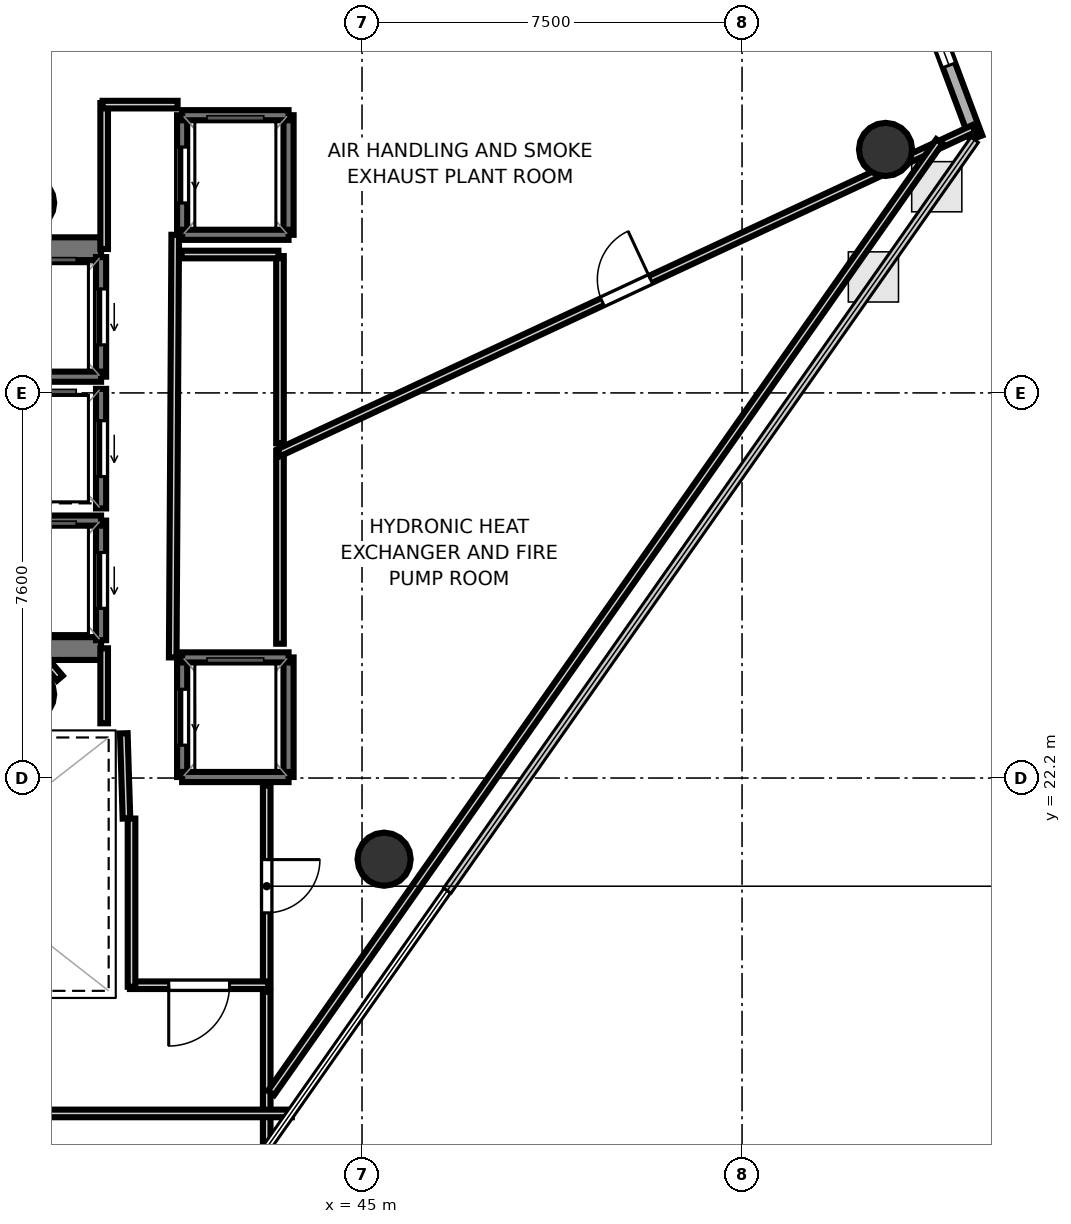
"""IFC4 building model, lengths in metres.
Left out: names, types, materials, properties, quantities, classifications, styles, units other than length and angle.
Written with IfcOpenShell. Run it as: python <this file> out.ifc"""

import sys

from ifc_helpers import new_model, si_unit, direction, frame, frame_2d, origin, origin_2d, place, context, subcontext, project, spatial, rectangle, hollow_circle, extrude, element, fill, save


model = new_model("IFC4")
c1 = context("Model", 3, precision=1e-05, world=origin(), true_north=direction((0.0, 1.0)))
c2 = subcontext(c1, "Body", "Model", "MODEL_VIEW")
j1 = project(units=[si_unit("LENGTHUNIT", "METRE"), si_unit("PLANEANGLEUNIT", "RADIAN")], contexts=[c1])
p1 = place(None, origin())
s1 = spatial("IfcSite", under=j1, at=p1, CompositionType="ELEMENT")
p2 = place(p1, origin())
s2 = spatial("IfcBuilding", under=s1, at=p2, CompositionType="ELEMENT")
p3 = place(p2, frame((0.0, 0.0, 276.0)))
s3 = spatial("IfcBuildingStorey", under=s2, at=p3, CompositionType="ELEMENT", Elevation=276.0)
p4 = place(p3, frame((29.33, 32.645, 0.0), z_axis=(0.0, 0.0, 1.0), x_axis=(1.0, 0.0, 0.0)))
e1 = element("IfcWall", 1, at=p4, inside=s3, PredefinedType="SHEAR", context=c2, shape_type="SweptSolid", body=[
    extrude(rectangle(XDim=10.52, YDim=0.45, at=frame_2d((5.26, 0.0))), origin(), (0.0, 0.0, 1.0), 4.42),
])
p5 = place(p4, frame((0.895, 0.0, 0.0)))
e2 = element("IfcOpeningElement", 2, at=p5, cuts=e1, PredefinedType="OPENING", context=c2, shape_type="SweptSolid", body=[
    extrude(rectangle(XDim=1.25, YDim=2.15, at=frame_2d((0.625, 1.075))), frame((0.0, 0.235, 0.0), z_axis=(0.0, -1.0, 0.0), x_axis=(1.0, 0.0, 0.0)), (0.0, 0.0, 1.0), 0.47),
])
p6 = place(p3, frame((29.33, 24.755, 0.0), z_axis=(0.0, 0.0, 1.0), x_axis=(1.0, 0.0, 0.0)))
e3 = element("IfcWall", 3, at=p6, inside=s3, PredefinedType="SHEAR", context=c2, shape_type="SweptSolid", body=[
    extrude(rectangle(XDim=10.52, YDim=0.45, at=frame_2d((5.26, 0.0))), origin(), (0.0, 0.0, 1.0), 4.42),
])
p7 = place(p6, frame((0.695, 0.0, 0.0)))
e4 = element("IfcOpeningElement", 4, at=p7, cuts=e3, PredefinedType="OPENING", context=c2, shape_type="SweptSolid", body=[
    extrude(rectangle(XDim=1.25, YDim=2.15, at=frame_2d((0.625, 1.075))), frame((0.0, 0.235, 0.0), z_axis=(0.0, -1.0, 0.0), x_axis=(1.0, 0.0, 0.0)), (0.0, 0.0, 1.0), 0.47),
])
for number, where, z_axis, x_axis in (
    (5, (38.4, 33.55, 0.0), (0.0, 0.0, 1.0), (1.0, 0.0, 0.0)),
    (6, (38.4, 23.85, 0.0), (0.0, 0.0, 1.0), (1.0, 0.0, 0.0)),
    (7, (55.332, 34.605, 0.0), (0.0, 0.0, 1.0), (1.0, 0.0, 0.0)),
    (8, (45.436, 20.598, 0.0), (0.0, 0.0, 1.0), (1.0, 0.0, 0.0)),
):
    element("IfcColumn", number, at=place(p3, frame(where, z_axis=z_axis, x_axis=x_axis)), inside=s3, PredefinedType="COLUMN", context=c2, shape_type="SweptSolid", body=[
        extrude(hollow_circle(Radius=0.525, WallThickness=0.028, at=origin_2d()), origin(), (0.0, 0.0, 1.0), 4.6),
    ])
p8 = place(p3, frame((57.12, 34.836, 0.0), z_axis=(0.0, 0.0, 1.0), x_axis=(-0.350828926288, 0.93643956798, 0.0)))
e9 = element("IfcWall", 9, at=p8, inside=s3, PredefinedType="SOLIDWALL", context=c2, shape_type="SweptSolid", body=[
    extrude(rectangle(XDim=4.452, YDim=0.26, at=frame_2d((2.226, 0.0))), origin(), (0.0, 0.0, 1.0), 4.42),
])
p9 = place(p8, frame((1.526, 0.0, 1.0)))
e10 = element("IfcOpeningElement", 10, at=p9, cuts=e9, PredefinedType="OPENING", context=c2, shape_type="SweptSolid", body=[
    extrude(rectangle(XDim=1.4, YDim=1.5, at=frame_2d((0.7, 0.75))), frame((0.0, 0.14, 0.0), z_axis=(0.0, -1.0, 0.0), x_axis=(1.0, 0.0, 0.0)), (0.0, 0.0, 1.0), 0.28),
])
p10 = place(p3, frame((39.85, 30.12, 0.0), z_axis=(0.0, 0.0, 1.0), x_axis=(0.0, 1.0, 0.0)))
e11 = element("IfcWall", 11, at=p10, inside=s3, PredefinedType="SOLIDWALL", context=c2, shape_type="SweptSolid", body=[
    extrude(rectangle(XDim=2.36, YDim=0.2, at=frame_2d((1.18, 0.0))), origin(), (0.0, 0.0, 1.0), 4.42),
])
p11 = place(p10, frame((0.63, 0.0, 0.0)))
e12 = element("IfcOpeningElement", 12, at=p11, cuts=e11, PredefinedType="OPENING", context=c2, shape_type="SweptSolid", body=[
    extrude(rectangle(XDim=1.1, YDim=2.15, at=frame_2d((0.55, 1.075))), frame((0.0, 0.11, 0.0), z_axis=(0.0, -1.0, 0.0), x_axis=(1.0, 0.0, 0.0)), (0.0, 0.0, 1.0), 0.22),
])
p12 = place(p3, frame((37.75, 30.12, 0.0), z_axis=(0.0, 0.0, 1.0), x_axis=(1.0, 0.0, 0.0)))
e13 = element("IfcWall", 13, at=p12, inside=s3, PredefinedType="SOLIDWALL", context=c2, shape_type="SweptSolid", body=[
    extrude(rectangle(XDim=2.1, YDim=0.2, at=frame_2d((1.05, 0.0))), origin(), (0.0, 0.0, 1.0), 4.42),
])
p13 = place(p3, frame((39.85, 24.92, 0.0), z_axis=(0.0, 0.0, 1.0), x_axis=(0.0, 1.0, 0.0)))
e14 = element("IfcWall", 14, at=p13, inside=s3, PredefinedType="SOLIDWALL", context=c2, shape_type="SweptSolid", body=[
    extrude(rectangle(XDim=2.36, YDim=0.2, at=frame_2d((1.18, 0.0))), origin(), (0.0, 0.0, 1.0), 4.42),
])
p14 = place(p13, frame((0.63, 0.0, 0.0)))
e15 = element("IfcOpeningElement", 15, at=p14, cuts=e14, PredefinedType="OPENING", context=c2, shape_type="SweptSolid", body=[
    extrude(rectangle(XDim=1.1, YDim=2.15, at=frame_2d((0.55, 1.075))), frame((0.0, 0.11, 0.0), z_axis=(0.0, -1.0, 0.0), x_axis=(1.0, 0.0, 0.0)), (0.0, 0.0, 1.0), 0.22),
])
p15 = place(p3, frame((37.75, 27.28, 0.0), z_axis=(0.0, 0.0, 1.0), x_axis=(1.0, 0.0, 0.0)))
e16 = element("IfcWall", 16, at=p15, inside=s3, PredefinedType="SOLIDWALL", context=c2, shape_type="SweptSolid", body=[
    extrude(rectangle(XDim=2.1, YDim=0.2, at=frame_2d((1.05, 0.0))), origin(), (0.0, 0.0, 1.0), 4.42),
])
p16 = place(p3, frame((39.85, 27.52, 0.0), z_axis=(0.0, 0.0, 1.0), x_axis=(0.0, 1.0, 0.0)))
e17 = element("IfcWall", 17, at=p16, inside=s3, PredefinedType="SOLIDWALL", context=c2, shape_type="SweptSolid", body=[
    extrude(rectangle(XDim=2.36, YDim=0.2, at=frame_2d((1.18, 0.0))), origin(), (0.0, 0.0, 1.0), 4.42),
])
p17 = place(p16, frame((0.63, 0.0, 0.0)))
e18 = element("IfcOpeningElement", 18, at=p17, cuts=e17, PredefinedType="OPENING", context=c2, shape_type="SweptSolid", body=[
    extrude(rectangle(XDim=1.1, YDim=2.15, at=frame_2d((0.55, 1.075))), frame((0.0, 0.11, 0.0), z_axis=(0.0, -1.0, 0.0), x_axis=(1.0, 0.0, 0.0)), (0.0, 0.0, 1.0), 0.22),
])
p18 = place(p3, frame((43.55, 22.22, 0.0), z_axis=(0.0, 0.0, 1.0), x_axis=(0.0, 1.0, 0.0)))
e19 = element("IfcWall", 19, at=p18, inside=s3, PredefinedType="SOLIDWALL", context=c2, shape_type="SweptSolid", body=[
    extrude(rectangle(XDim=2.36, YDim=0.2, at=frame_2d((1.18, 0.0))), origin(), (0.0, 0.0, 1.0), 4.42),
])
p19 = place(p3, frame((41.45, 22.22, 0.0), z_axis=(0.0, 0.0, 1.0), x_axis=(0.0, 1.0, 0.0)))
e20 = element("IfcWall", 20, at=p19, inside=s3, PredefinedType="SOLIDWALL", context=c2, shape_type="SweptSolid", body=[
    extrude(rectangle(XDim=2.36, YDim=0.2, at=frame_2d((1.18, 0.0))), origin(), (0.0, 0.0, 1.0), 4.42),
])
p20 = place(p19, frame((0.63, 0.0, 0.0)))
e21 = element("IfcOpeningElement", 21, at=p20, cuts=e20, PredefinedType="OPENING", context=c2, shape_type="SweptSolid", body=[
    extrude(rectangle(XDim=1.1, YDim=2.15, at=frame_2d((0.55, 1.075))), frame((0.0, 0.11, 0.0), z_axis=(0.0, -1.0, 0.0), x_axis=(1.0, 0.0, 0.0)), (0.0, 0.0, 1.0), 0.22),
])
for number, where, z_axis, x_axis in (
    (22, (41.45, 24.58, 0.0), (0.0, 0.0, 1.0), (1.0, 0.0, 0.0)),
    (23, (41.45, 22.22, 0.0), (0.0, 0.0, 1.0), (1.0, 0.0, 0.0)),
):
    element("IfcWall", number, at=place(p3, frame(where, z_axis=z_axis, x_axis=x_axis)), inside=s3, PredefinedType="SOLIDWALL", context=c2, shape_type="SweptSolid", body=[
        extrude(rectangle(XDim=2.1, YDim=0.2, at=frame_2d((1.05, 0.0))), origin(), (0.0, 0.0, 1.0), 4.42),
    ])
p21 = place(p3, frame((43.55, 32.92, 0.0), z_axis=(0.0, 0.0, 1.0), x_axis=(0.0, 1.0, 0.0)))
e24 = element("IfcWall", 24, at=p21, inside=s3, PredefinedType="SOLIDWALL", context=c2, shape_type="SweptSolid", body=[
    extrude(rectangle(XDim=2.36, YDim=0.2, at=frame_2d((1.18, 0.0))), origin(), (0.0, 0.0, 1.0), 4.42),
])
p22 = place(p3, frame((41.45, 32.92, 0.0), z_axis=(0.0, 0.0, 1.0), x_axis=(0.0, 1.0, 0.0)))
e25 = element("IfcWall", 25, at=p22, inside=s3, PredefinedType="SOLIDWALL", context=c2, shape_type="SweptSolid", body=[
    extrude(rectangle(XDim=2.36, YDim=0.2, at=frame_2d((1.18, 0.0))), origin(), (0.0, 0.0, 1.0), 4.42),
])
p23 = place(p22, frame((0.63, 0.0, 0.0)))
e26 = element("IfcOpeningElement", 26, at=p23, cuts=e25, PredefinedType="OPENING", context=c2, shape_type="SweptSolid", body=[
    extrude(rectangle(XDim=1.1, YDim=2.15, at=frame_2d((0.55, 1.075))), frame((0.0, 0.11, 0.0), z_axis=(0.0, -1.0, 0.0), x_axis=(1.0, 0.0, 0.0)), (0.0, 0.0, 1.0), 0.22),
])
for number, where, z_axis, x_axis in (
    (27, (41.45, 35.28, 0.0), (0.0, 0.0, 1.0), (1.0, 0.0, 0.0)),
    (28, (41.45, 32.92, 0.0), (0.0, 0.0, 1.0), (1.0, 0.0, 0.0)),
):
    element("IfcWall", number, at=place(p3, frame(where, z_axis=z_axis, x_axis=x_axis)), inside=s3, PredefinedType="SOLIDWALL", context=c2, shape_type="SweptSolid", body=[
        extrude(rectangle(XDim=2.1, YDim=0.2, at=frame_2d((1.05, 0.0))), origin(), (0.0, 0.0, 1.0), 4.42),
    ])
p24 = place(p3, frame((40.351, 21.401, 0.0), z_axis=(0.0, 0.0, 1.0), x_axis=(-0.031058045979, 0.999517582527, 0.0)))
e29 = element("IfcWall", 29, at=p24, inside=s3, PredefinedType="PARTITIONING", context=c2, shape_type="SweptSolid", body=[
    extrude(rectangle(XDim=1.682, YDim=0.15, at=frame_2d((0.841, 0.0))), origin(), (0.0, 0.0, 1.0), 2.94),
])
p25 = place(p3, frame((39.911, 23.28, 0.0), z_axis=(0.0, 0.0, 1.0), x_axis=(0.0, 1.0, 0.0)))
e30 = element("IfcWall", 30, at=p25, inside=s3, PredefinedType="PARTITIONING", context=c2, shape_type="SweptSolid", body=[
    extrude(rectangle(XDim=1.48, YDim=0.15, at=frame_2d((0.74, 0.0))), origin(), (0.0, 0.0, 1.0), 2.94),
])
p26 = place(p3, frame((39.911, 32.64, 0.0), z_axis=(0.0, 0.0, 1.0), x_axis=(0.0, 1.0, 0.0)))
e31 = element("IfcWall", 31, at=p26, inside=s3, PredefinedType="PARTITIONING", context=c2, shape_type="SweptSolid", body=[
    extrude(rectangle(XDim=2.88, YDim=0.15, at=frame_2d((1.44, 0.0))), origin(), (0.0, 0.0, 1.0), 2.94),
])
p27 = place(p3, frame((39.88, 35.489, 0.0), z_axis=(0.0, 0.0, 1.0), x_axis=(1.0, 0.0, 0.0)))
e32 = element("IfcWall", 32, at=p27, inside=s3, PredefinedType="PARTITIONING", context=c2, shape_type="SweptSolid", body=[
    extrude(rectangle(XDim=1.48, YDim=0.15, at=frame_2d((0.74, 0.0))), origin(), (0.0, 0.0, 1.0), 2.94),
])
p28 = place(p3, frame((41.313, 32.92, 0.0), z_axis=(0.0, 0.0, 1.0), x_axis=(-0.005942518022, -0.999982343084, 0.0)))
e33 = element("IfcWall", 33, at=p28, inside=s3, PredefinedType="PARTITIONING", context=c2, shape_type="SweptSolid", body=[
    extrude(rectangle(XDim=8.34, YDim=0.15, at=frame_2d((4.17, 0.0))), origin(), (0.0, 0.0, 1.0), 2.94),
])
p29 = place(p3, frame((43.119, 22.05, 0.0), z_axis=(0.0, 0.0, 1.0), x_axis=(0.0, -1.0, 0.0)))
e34 = element("IfcWall", 34, at=p29, inside=s3, PredefinedType="PARTITIONING", context=c2, shape_type="SweptSolid", body=[
    extrude(rectangle(XDim=3.97, YDim=0.15, at=frame_2d((1.985, 0.0))), origin(), (0.0, 0.0, 1.0), 2.94),
])
p30 = place(p29, frame((1.46, 0.0, 0.0)))
e35 = element("IfcOpeningElement", 35, at=p30, cuts=e34, PredefinedType="OPENING", context=c2, shape_type="SweptSolid", body=[
    extrude(rectangle(XDim=1.05, YDim=2.15, at=frame_2d((0.525, 1.075))), frame((0.0, 0.085, 0.0), z_axis=(0.0, -1.0, 0.0), x_axis=(1.0, 0.0, 0.0)), (0.0, 0.0, 1.0), 0.17),
])
p31 = place(p3, frame((43.15, 18.111, 0.0), z_axis=(0.0, 0.0, 1.0), x_axis=(-1.0, 0.0, 0.0)))
e36 = element("IfcWall", 36, at=p31, inside=s3, PredefinedType="PARTITIONING", context=c2, shape_type="SweptSolid", body=[
    extrude(rectangle(XDim=2.73, YDim=0.15, at=frame_2d((1.365, 0.0))), origin(), (0.0, 0.0, 1.0), 2.94),
])
p32 = place(p31, frame((0.765, 0.0, 0.0)))
e37 = element("IfcOpeningElement", 37, at=p32, cuts=e36, PredefinedType="OPENING", context=c2, shape_type="SweptSolid", body=[
    extrude(rectangle(XDim=1.2, YDim=2.15, at=frame_2d((0.6, 1.075))), frame((0.0, 0.085, 0.0), z_axis=(0.0, -1.0, 0.0), x_axis=(1.0, 0.0, 0.0)), (0.0, 0.0, 1.0), 0.17),
])
p33 = place(p3, frame((40.451, 18.08, 0.0), z_axis=(0.0, 0.0, 1.0), x_axis=(0.0, 1.0, 0.0)))
e38 = element("IfcWall", 38, at=p33, inside=s3, PredefinedType="PARTITIONING", context=c2, shape_type="SweptSolid", body=[
    extrude(rectangle(XDim=3.32, YDim=0.15, at=frame_2d((1.66, 0.0))), origin(), (0.0, 0.0, 1.0), 2.94),
])
p34 = place(p3, frame((39.036, 24.17, 0.0), z_axis=(0.0, 0.0, 1.0), x_axis=(-0.652260263346, 0.757995084984, 0.0)))
e39 = element("IfcWall", 39, at=p34, inside=s3, PredefinedType="PARTITIONING", context=c2, shape_type="SweptSolid", body=[
    extrude(rectangle(XDim=0.355, YDim=0.15, at=frame_2d((0.178, 0.0))), origin(), (0.0, 0.0, 1.0), 2.94),
])
p35 = place(p3, frame((43.119, 17.98, 0.0), z_axis=(0.0, 0.0, 1.0), x_axis=(0.0, -1.0, 0.0)))
e40 = element("IfcWall", 40, at=p35, inside=s3, PredefinedType="PARTITIONING", context=c2, shape_type="SweptSolid", body=[
    extrude(rectangle(XDim=3.095, YDim=0.15, at=frame_2d((1.548, 0.0))), origin(), (0.0, 0.0, 1.0), 2.94),
])
p36 = place(p3, frame((43.614, 15.581, 0.0), z_axis=(0.0, 0.0, 1.0), x_axis=(-1.0, 0.0, 0.0)))
e41 = element("IfcWall", 41, at=p36, inside=s3, PredefinedType="PARTITIONING", context=c2, shape_type="SweptSolid", body=[
    extrude(rectangle(XDim=13.564, YDim=0.15, at=frame_2d((6.782, 0.0))), origin(), (0.0, 0.0, 1.0), 2.94),
])
p37 = place(p36, frame((8.443, 0.0, 0.0)))
e42 = element("IfcOpeningElement", 42, at=p37, cuts=e41, PredefinedType="OPENING", context=c2, shape_type="SweptSolid", body=[
    extrude(rectangle(XDim=1.2, YDim=2.15, at=frame_2d((0.6, 1.075))), frame((0.0, 0.085, 0.0), z_axis=(0.0, -1.0, 0.0), x_axis=(1.0, 0.0, 0.0)), (0.0, 0.0, 1.0), 0.17),
])
p38 = place(p3, frame((38.32, 15.467, 0.0), z_axis=(0.0, 0.0, 1.0), x_axis=(0.08718021707, -0.996192556563, 0.0)))
e43 = element("IfcWall", 43, at=p38, inside=s3, PredefinedType="PARTITIONING", context=c2, shape_type="SweptSolid", body=[
    extrude(rectangle(XDim=6.62, YDim=0.15, at=frame_2d((3.31, 0.0))), origin(), (0.0, 0.0, 1.0), 2.94),
])
p39 = place(p3, frame((43.381, 24.85, 0.0), z_axis=(0.0, 0.0, 1.0), x_axis=(0.0, 1.0, 0.0)))
e44 = element("IfcWall", 44, at=p39, inside=s3, PredefinedType="PARTITIONING", context=c2, shape_type="SweptSolid", body=[
    extrude(rectangle(XDim=3.801, YDim=0.15, at=frame_2d((1.9, 0.0))), origin(), (0.0, 0.0, 1.0), 2.94),
])
p40 = place(p3, frame((43.363, 28.623, 0.0), z_axis=(0.0, 0.0, 1.0), x_axis=(0.90631008508, 0.422613333535, 0.0)))
e45 = element("IfcWall", 45, at=p40, inside=s3, PredefinedType="PARTITIONING", context=c2, shape_type="SweptSolid", body=[
    extrude(rectangle(XDim=15.128, YDim=0.15, at=frame_2d((7.564, 0.0))), origin(), (0.0, 0.0, 1.0), 2.94),
])
p41 = place(p40, frame((7.039, 0.0, 0.0)))
e46 = element("IfcOpeningElement", 46, at=p41, cuts=e45, PredefinedType="OPENING", context=c2, shape_type="SweptSolid", body=[
    extrude(rectangle(XDim=1.05, YDim=2.15, at=frame_2d((0.525, 1.075))), frame((0.0, 0.085, 0.0), z_axis=(0.0, -1.0, 0.0), x_axis=(1.0, 0.0, 0.0)), (0.0, 0.0, 1.0), 0.17),
])
p42 = place(p3, frame((56.396, 34.764, 0.0), z_axis=(0.0, 0.0, 1.0), x_axis=(-0.574813853257, -0.818284201304, 0.0)))
e47 = element("IfcWall", 47, at=p42, inside=s3, PredefinedType="PARTITIONING", context=c2, shape_type="SweptSolid", body=[
    extrude(rectangle(XDim=22.949, YDim=0.15, at=frame_2d((11.475, 0.0))), origin(), (0.0, 0.0, 1.0), 2.94),
])
p43 = place(p3, frame((43.381, 28.805, 0.0), z_axis=(0.0, 0.0, 1.0), x_axis=(0.0, 1.0, 0.0)))
e48 = element("IfcWall", 48, at=p43, inside=s3, PredefinedType="PARTITIONING", context=c2, shape_type="SweptSolid", body=[
    extrude(rectangle(XDim=3.695, YDim=0.15, at=frame_2d((1.847, 0.0))), origin(), (0.0, 0.0, 1.0), 2.94),
])
p44 = place(p3, frame((43.35, 32.531, 0.0), z_axis=(0.0, 0.0, 1.0), x_axis=(-1.0, 0.0, 0.0)))
e49 = element("IfcWall", 49, at=p44, inside=s3, PredefinedType="PARTITIONING", context=c2, shape_type="SweptSolid", body=[
    extrude(rectangle(XDim=1.91, YDim=0.15, at=frame_2d((0.955, 0.0))), origin(), (0.0, 0.0, 1.0), 2.94),
])
p45 = place(p11, origin())
e50 = element("IfcDoor", 50, at=p45, inside=s3, OperationType="SLIDING_TO_LEFT", PredefinedType="DOOR", context=c2, shape_type="SweptSolid", body=[
    extrude(rectangle(XDim=1.1, YDim=2.15, at=frame_2d((0.55, 1.075))), frame((0.0, 0.025, 0.0), z_axis=(0.0, -1.0, 0.0), x_axis=(1.0, 0.0, 0.0)), (0.0, 0.0, 1.0), 0.05),
])
fill(e12, e50)
p46 = place(p14, origin())
e51 = element("IfcDoor", 51, at=p46, inside=s3, OperationType="SLIDING_TO_LEFT", PredefinedType="DOOR", context=c2, shape_type="SweptSolid", body=[
    extrude(rectangle(XDim=1.1, YDim=2.15, at=frame_2d((0.55, 1.075))), frame((0.0, 0.025, 0.0), z_axis=(0.0, -1.0, 0.0), x_axis=(1.0, 0.0, 0.0)), (0.0, 0.0, 1.0), 0.05),
])
fill(e15, e51)
p47 = place(p17, origin())
e52 = element("IfcDoor", 52, at=p47, inside=s3, OperationType="SLIDING_TO_LEFT", PredefinedType="DOOR", context=c2, shape_type="SweptSolid", body=[
    extrude(rectangle(XDim=1.1, YDim=2.15, at=frame_2d((0.55, 1.075))), frame((0.0, 0.025, 0.0), z_axis=(0.0, -1.0, 0.0), x_axis=(1.0, 0.0, 0.0)), (0.0, 0.0, 1.0), 0.05),
])
fill(e18, e52)
p48 = place(p20, origin())
e53 = element("IfcDoor", 53, at=p48, inside=s3, OperationType="SLIDING_TO_LEFT", PredefinedType="DOOR", context=c2, shape_type="SweptSolid", body=[
    extrude(rectangle(XDim=1.1, YDim=2.15, at=frame_2d((0.55, 1.075))), frame((0.0, 0.025, 0.0), z_axis=(0.0, -1.0, 0.0), x_axis=(1.0, 0.0, 0.0)), (0.0, 0.0, 1.0), 0.05),
])
fill(e21, e53)
p49 = place(p23, origin())
e54 = element("IfcDoor", 54, at=p49, inside=s3, OperationType="SLIDING_TO_LEFT", PredefinedType="DOOR", context=c2, shape_type="SweptSolid", body=[
    extrude(rectangle(XDim=1.1, YDim=2.15, at=frame_2d((0.55, 1.075))), frame((0.0, 0.025, 0.0), z_axis=(0.0, -1.0, 0.0), x_axis=(1.0, 0.0, 0.0)), (0.0, 0.0, 1.0), 0.05),
])
fill(e26, e54)
p50 = place(p32, origin())
e55 = element("IfcDoor", 55, at=p50, inside=s3, OperationType="SINGLE_SWING_RIGHT", PredefinedType="DOOR", context=c2, shape_type="SweptSolid", body=[
    extrude(rectangle(XDim=1.2, YDim=2.15, at=frame_2d((0.6, 1.075))), frame((0.0, 0.025, 0.0), z_axis=(0.0, -1.0, 0.0), x_axis=(1.0, 0.0, 0.0)), (0.0, 0.0, 1.0), 0.05),
])
fill(e37, e55)
p51 = place(p30, origin())
e56 = element("IfcDoor", 56, at=p51, inside=s3, OperationType="SINGLE_SWING_LEFT", PredefinedType="DOOR", context=c2, shape_type="SweptSolid", body=[
    extrude(rectangle(XDim=1.05, YDim=2.15, at=frame_2d((0.525, 1.075))), frame((0.0, 0.025, 0.0), z_axis=(0.0, -1.0, 0.0), x_axis=(1.0, 0.0, 0.0)), (0.0, 0.0, 1.0), 0.05),
])
fill(e35, e56)
p52 = place(p41, origin())
e57 = element("IfcDoor", 57, at=p52, inside=s3, OperationType="SINGLE_SWING_RIGHT", PredefinedType="DOOR", context=c2, shape_type="SweptSolid", body=[
    extrude(rectangle(XDim=1.05, YDim=2.15, at=frame_2d((0.525, 1.075))), frame((0.0, 0.025, 0.0), z_axis=(0.0, -1.0, 0.0), x_axis=(1.0, 0.0, 0.0)), (0.0, 0.0, 1.0), 0.05),
])
fill(e46, e57)
p53 = place(p9, origin())
e58 = element("IfcWindow", 58, at=p53, inside=s3, PartitioningType="SINGLE_PANEL", PredefinedType="WINDOW", context=c2, shape_type="SweptSolid", body=[
    extrude(rectangle(XDim=1.4, YDim=1.5, at=frame_2d((0.7, 0.75))), frame((0.0, 0.03, 0.0), z_axis=(0.0, -1.0, 0.0), x_axis=(1.0, 0.0, 0.0)), (0.0, 0.0, 1.0), 0.06),
])
fill(e10, e58)
save(model, sys.argv[1])
